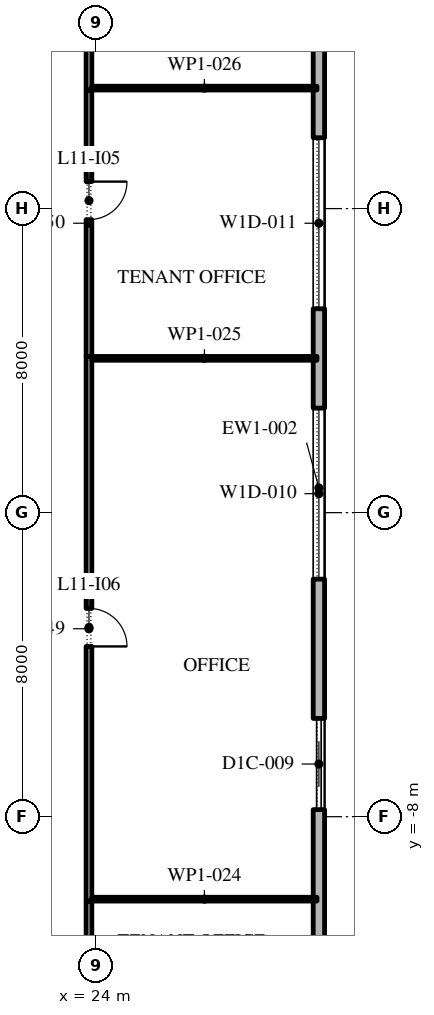
"""IFC4 building model, lengths in metres.
Left out: names, types, materials, properties, quantities, classifications, styles, units other than length and angle.
Written with IfcOpenShell. Run it as: python <this file> out.ifc"""

import sys

from ifc_helpers import new_model, si_unit, direction, frame, frame_2d, origin, place, context, subcontext, project, spatial, rectangle, extrude, element, fill, save


model = new_model("IFC4")
c1 = context("Model", 3, precision=1e-05, world=origin(), true_north=direction((0.0, 1.0)))
c2 = subcontext(c1, "Body", "Model", "MODEL_VIEW")
j1 = project(units=[si_unit("LENGTHUNIT", "METRE"), si_unit("PLANEANGLEUNIT", "RADIAN")], contexts=[c1])
p1 = place(None, origin())
s1 = spatial("IfcSite", under=j1, at=p1, CompositionType="ELEMENT")
p2 = place(p1, origin())
s2 = spatial("IfcBuilding", under=s1, at=p2, CompositionType="ELEMENT")
p3 = place(p2, frame((0.0, 0.0, 56.4)))
s3 = spatial("IfcBuildingStorey", under=s2, at=p3, CompositionType="ELEMENT", Elevation=56.4)
p4 = place(p3, frame((29.85, -24.1, 0.0), z_axis=(0.0, 0.0, 1.0), x_axis=(0.0, 1.0, 0.0)))
e1 = element("IfcWall", 1, at=p4, inside=s3, PredefinedType="STANDARD", context=c2, shape_type="SweptSolid", body=[
    extrude(rectangle(XDim=49.5, YDim=0.3, at=frame_2d((24.75, 0.0))), origin(), (0.0, 0.0, 1.0), 4.0),
])
p5 = place(p4, frame((1.157, 0.0, 0.45)))
e2 = element("IfcOpeningElement", 2, at=p5, cuts=e1, PredefinedType="OPENING", context=c2, shape_type="SweptSolid", body=[
    extrude(rectangle(XDim=4.5, YDim=3.05, at=frame_2d((2.25, 1.525))), frame((0.0, 0.16, 0.0), z_axis=(0.0, -1.0, 0.0), x_axis=(1.0, 0.0, 0.0)), (0.0, 0.0, 1.0), 0.32),
])
p6 = place(p4, frame((8.121, 0.0, 0.45)))
e3 = element("IfcOpeningElement", 3, at=p6, cuts=e1, PredefinedType="OPENING", context=c2, shape_type="SweptSolid", body=[
    extrude(rectangle(XDim=4.5, YDim=2.825, at=frame_2d((2.25, 1.413))), frame((0.0, 0.16, 0.0), z_axis=(0.0, -1.0, 0.0), x_axis=(1.0, 0.0, 0.0)), (0.0, 0.0, 1.0), 0.32),
])
p7 = place(p4, frame((16.286, 0.0, 0.0)))
e4 = element("IfcOpeningElement", 4, at=p7, cuts=e1, PredefinedType="OPENING", context=c2, shape_type="SweptSolid", body=[
    extrude(rectangle(XDim=2.4, YDim=3.325, at=frame_2d((1.2, 1.663))), frame((0.0, 0.16, 0.0), z_axis=(0.0, -1.0, 0.0), x_axis=(1.0, 0.0, 0.0)), (0.0, 0.0, 1.0), 0.32),
])
p8 = place(p4, frame((22.35, 0.0, 0.45)))
e5 = element("IfcOpeningElement", 5, at=p8, cuts=e1, PredefinedType="OPENING", context=c2, shape_type="SweptSolid", body=[
    extrude(rectangle(XDim=4.5, YDim=2.875, at=frame_2d((2.25, 1.438))), frame((0.0, 0.16, 0.0), z_axis=(0.0, -1.0, 0.0), x_axis=(1.0, 0.0, 0.0)), (0.0, 0.0, 1.0), 0.32),
])
p9 = place(p4, frame((29.464, 0.0, 0.45)))
e6 = element("IfcOpeningElement", 6, at=p9, cuts=e1, PredefinedType="OPENING", context=c2, shape_type="SweptSolid", body=[
    extrude(rectangle(XDim=4.5, YDim=2.875, at=frame_2d((2.25, 1.438))), frame((0.0, 0.16, 0.0), z_axis=(0.0, -1.0, 0.0), x_axis=(1.0, 0.0, 0.0)), (0.0, 0.0, 1.0), 0.32),
])
p10 = place(p4, frame((36.579, 0.0, 0.45)))
e7 = element("IfcOpeningElement", 7, at=p10, cuts=e1, PredefinedType="OPENING", context=c2, shape_type="SweptSolid", body=[
    extrude(rectangle(XDim=4.5, YDim=3.05, at=frame_2d((2.25, 1.525))), frame((0.0, 0.16, 0.0), z_axis=(0.0, -1.0, 0.0), x_axis=(1.0, 0.0, 0.0)), (0.0, 0.0, 1.0), 0.32),
])
p11 = place(p4, frame((44.743, 0.0, 0.0)))
e8 = element("IfcOpeningElement", 8, at=p11, cuts=e1, PredefinedType="OPENING", context=c2, shape_type="SweptSolid", body=[
    extrude(rectangle(XDim=2.4, YDim=3.325, at=frame_2d((1.2, 1.663))), frame((0.0, 0.16, 0.0), z_axis=(0.0, -1.0, 0.0), x_axis=(1.0, 0.0, 0.0)), (0.0, 0.0, 1.0), 0.32),
])
p12 = place(p3, frame((23.8, -10.22, 0.0), z_axis=(0.0, 0.0, 1.0), x_axis=(0.0, -1.0, 0.0)))
e9 = element("IfcWall", 9, at=p12, inside=s3, PredefinedType="PARTITIONING", context=c2, shape_type="SweptSolid", body=[
    extrude(rectangle(XDim=7.12, YDim=0.15, at=frame_2d((3.56, 0.0))), origin(), (0.0, 0.0, 1.0), 4.0),
])
p13 = place(p12, frame((4.42, 0.0, 0.0)))
e10 = element("IfcOpeningElement", 10, at=p13, cuts=e9, PredefinedType="OPENING", context=c2, shape_type="SweptSolid", body=[
    extrude(rectangle(XDim=1.0, YDim=2.1, at=frame_2d((0.5, 1.05))), frame((0.0, 0.085, 0.0), z_axis=(0.0, -1.0, 0.0), x_axis=(1.0, 0.0, 0.0)), (0.0, 0.0, 1.0), 0.17),
])
p14 = place(p3, frame((23.8, 4.11, 0.0), z_axis=(0.0, 0.0, 1.0), x_axis=(0.0, -1.0, 0.0)))
e11 = element("IfcWall", 11, at=p14, inside=s3, PredefinedType="PARTITIONING", context=c2, shape_type="SweptSolid", body=[
    extrude(rectangle(XDim=14.33, YDim=0.15, at=frame_2d((7.165, 0.0))), origin(), (0.0, 0.0, 1.0), 4.0),
])
p15 = place(p14, frame((6.63, 0.0, 0.0)))
e12 = element("IfcOpeningElement", 12, at=p15, cuts=e11, PredefinedType="OPENING", context=c2, shape_type="SweptSolid", body=[
    extrude(rectangle(XDim=1.0, YDim=2.1, at=frame_2d((0.5, 1.05))), frame((0.0, 0.085, 0.0), z_axis=(0.0, -1.0, 0.0), x_axis=(1.0, 0.0, 0.0)), (0.0, 0.0, 1.0), 0.17),
])
p16 = place(p3, frame((23.8, 11.12, 0.0), z_axis=(0.0, 0.0, 1.0), x_axis=(0.0, -1.0, 0.0)))
e13 = element("IfcWall", 13, at=p16, inside=s3, PredefinedType="PARTITIONING", context=c2, shape_type="SweptSolid", body=[
    extrude(rectangle(XDim=7.01, YDim=0.15, at=frame_2d((3.505, 0.0))), origin(), (0.0, 0.0, 1.0), 4.0),
])
p17 = place(p16, frame((2.41, 0.0, 0.0)))
e14 = element("IfcOpeningElement", 14, at=p17, cuts=e13, PredefinedType="OPENING", context=c2, shape_type="SweptSolid", body=[
    extrude(rectangle(XDim=1.0, YDim=2.1, at=frame_2d((0.5, 1.05))), frame((0.0, 0.085, 0.0), z_axis=(0.0, -1.0, 0.0), x_axis=(1.0, 0.0, 0.0)), (0.0, 0.0, 1.0), 0.17),
])
p18 = place(p3, frame((23.8, 27.2, 0.0), z_axis=(0.0, 0.0, 1.0), x_axis=(0.0, -1.0, 0.0)))
e15 = element("IfcWall", 15, at=p18, inside=s3, PredefinedType="PARTITIONING", context=c2, shape_type="SweptSolid", body=[
    extrude(rectangle(XDim=16.08, YDim=0.15, at=frame_2d((8.04, 0.0))), origin(), (0.0, 0.0, 1.0), 4.0),
])
p19 = place(p18, frame((9.13, 0.0, 0.0)))
e16 = element("IfcOpeningElement", 16, at=p19, cuts=e15, PredefinedType="OPENING", context=c2, shape_type="SweptSolid", body=[
    extrude(rectangle(XDim=1.0, YDim=2.1, at=frame_2d((0.5, 1.05))), frame((0.0, 0.085, 0.0), z_axis=(0.0, -1.0, 0.0), x_axis=(1.0, 0.0, 0.0)), (0.0, 0.0, 1.0), 0.17),
])
for number, where, z_axis, x_axis in (
    (17, (29.8, -10.17, 0.0), (0.0, 0.0, 1.0), (-1.0, 0.0, 0.0)),
    (18, (29.8, 4.06, 0.0), (0.0, 0.0, 1.0), (-1.0, 0.0, 0.0)),
    (19, (29.8, 11.17, 0.0), (0.0, 0.0, 1.0), (-1.0, 0.0, 0.0)),
):
    element("IfcWall", number, at=place(p3, frame(where, z_axis=z_axis, x_axis=x_axis)), inside=s3, PredefinedType="PARTITIONING", context=c2, shape_type="SweptSolid", body=[
        extrude(rectangle(XDim=5.925, YDim=0.1, at=frame_2d((2.962, 0.0))), origin(), (0.0, 0.0, 1.0), 4.0),
    ])
p20 = place(p7, origin())
e20 = element("IfcDoor", 20, at=p20, inside=s3, OperationType="DOUBLE_DOOR_SLIDING", PredefinedType="DOOR", context=c2, shape_type="SweptSolid", body=[
    extrude(rectangle(XDim=2.4, YDim=3.325, at=frame_2d((1.2, 1.663))), frame((0.0, 0.025, 0.0), z_axis=(0.0, -1.0, 0.0), x_axis=(1.0, 0.0, 0.0)), (0.0, 0.0, 1.0), 0.05),
])
fill(e4, e20)
p21 = place(p8, origin())
e21 = element("IfcWindow", 21, at=p21, inside=s3, PartitioningType="DOUBLE_PANEL_VERTICAL", PredefinedType="WINDOW", context=c2, shape_type="SweptSolid", body=[
    extrude(rectangle(XDim=4.5, YDim=2.875, at=frame_2d((2.25, 1.438))), frame((0.0, 0.03, 0.0), z_axis=(0.0, -1.0, 0.0), x_axis=(1.0, 0.0, 0.0)), (0.0, 0.0, 1.0), 0.06),
])
fill(e5, e21)
p22 = place(p9, origin())
e22 = element("IfcWindow", 22, at=p22, inside=s3, PartitioningType="DOUBLE_PANEL_VERTICAL", PredefinedType="WINDOW", context=c2, shape_type="SweptSolid", body=[
    extrude(rectangle(XDim=4.5, YDim=2.875, at=frame_2d((2.25, 1.438))), frame((0.0, 0.03, 0.0), z_axis=(0.0, -1.0, 0.0), x_axis=(1.0, 0.0, 0.0)), (0.0, 0.0, 1.0), 0.06),
])
fill(e6, e22)
p23 = place(p17, origin())
e23 = element("IfcDoor", 23, at=p23, inside=s3, OperationType="SINGLE_SWING_RIGHT", PredefinedType="DOOR", context=c2, shape_type="SweptSolid", body=[
    extrude(rectangle(XDim=1.0, YDim=2.1, at=frame_2d((0.5, 1.05))), frame((0.0, 0.025, 0.0), z_axis=(0.0, -1.0, 0.0), x_axis=(1.0, 0.0, 0.0)), (0.0, 0.0, 1.0), 0.05),
])
fill(e14, e23)
p24 = place(p15, origin())
e24 = element("IfcDoor", 24, at=p24, inside=s3, OperationType="SINGLE_SWING_LEFT", PredefinedType="DOOR", context=c2, shape_type="SweptSolid", body=[
    extrude(rectangle(XDim=1.0, YDim=2.1, at=frame_2d((0.5, 1.05))), frame((0.0, 0.025, 0.0), z_axis=(0.0, -1.0, 0.0), x_axis=(1.0, 0.0, 0.0)), (0.0, 0.0, 1.0), 0.05),
])
fill(e12, e24)
save(model, sys.argv[1])
